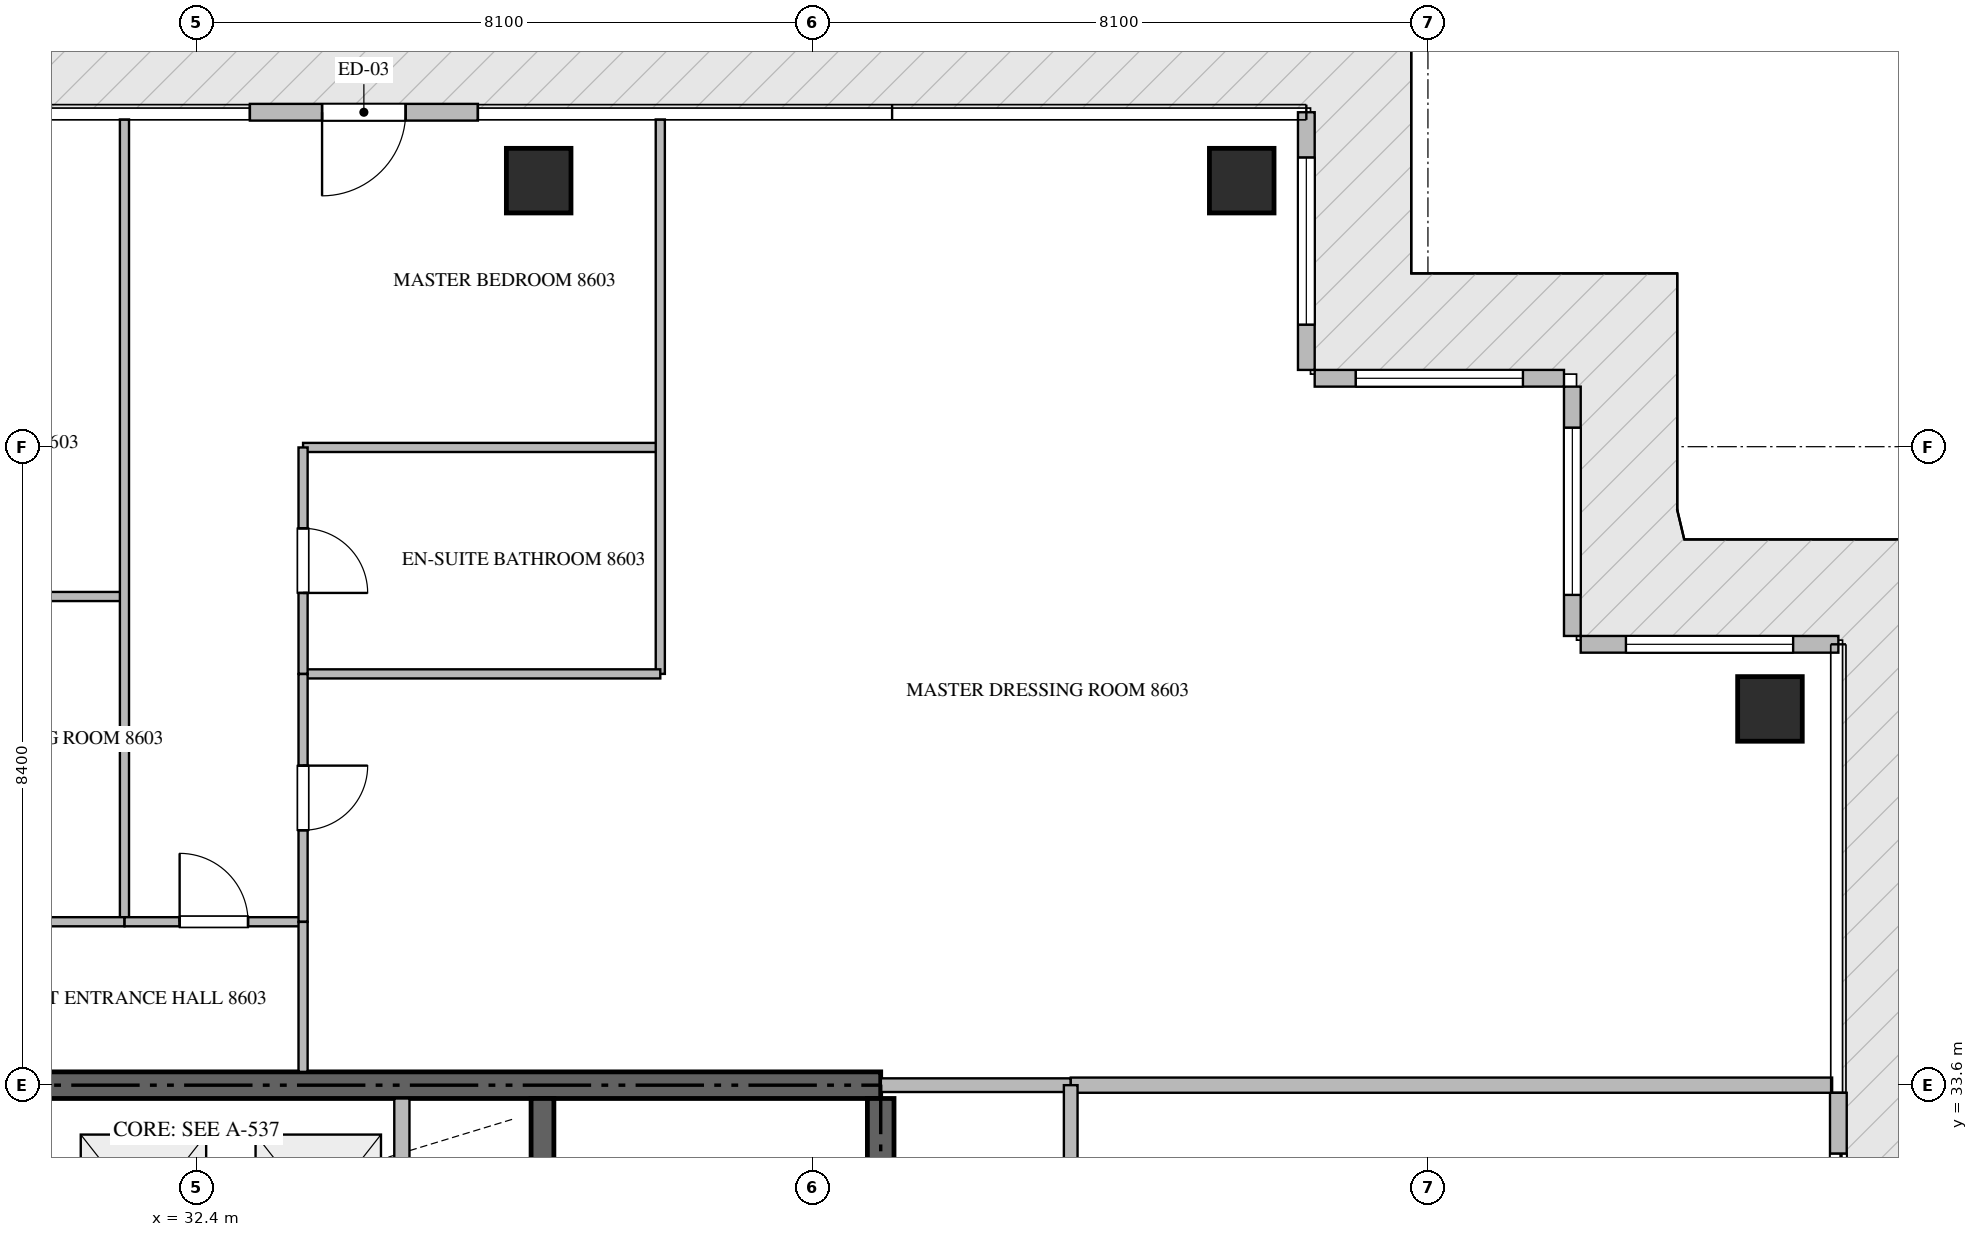
"""IFC4 building model, lengths in metres.
Left out: names, types, materials, properties, quantities, classifications, styles, units other than length and angle.
Written with IfcOpenShell. Run it as: python <this file> out.ifc"""

import sys

from ifc_helpers import new_model, si_unit, direction, frame, frame_2d, origin, origin_2d, place, context, subcontext, project, spatial, rectangle, extrude, source, transform, mapped, element, fill, save


model = new_model("IFC4")
c1 = context("Model", 3, precision=1e-05, world=origin(), true_north=direction((0.0, 1.0)))
c2 = subcontext(c1, "Body", "Model", "MODEL_VIEW")
j1 = project(units=[si_unit("LENGTHUNIT", "METRE"), si_unit("PLANEANGLEUNIT", "RADIAN")], contexts=[c1])
p1 = place(None, origin())
s1 = spatial("IfcSite", under=j1, at=p1, CompositionType="ELEMENT")
p2 = place(p1, origin())
s2 = spatial("IfcBuilding", under=s1, at=p2, CompositionType="ELEMENT")
p3 = place(p2, frame((0.0, 0.0, 347.95)))
s3 = spatial("IfcBuildingStorey", under=s2, at=p3, CompositionType="ELEMENT", Elevation=347.95)
p4 = place(p3, frame((41.4, 33.6, -0.26), z_axis=(0.0, 0.0, 1.0), x_axis=(-1.0, 0.0, 0.0)))
e1 = element("IfcWall", 1, at=p4, inside=s3, PredefinedType="SHEAR", context=c2, shape_type="SweptSolid", body=[
    extrude(rectangle(XDim=18.0, YDim=0.35, at=frame_2d((9.0, 0.0))), origin(), (0.0, 0.0, 1.0), 5.898),
])
p5 = place(p3, frame((41.4, 27.75, -0.26), z_axis=(0.0, 0.0, 1.0), x_axis=(0.0, 1.0, 0.0)))
e2 = element("IfcWall", 2, at=p5, inside=s3, PredefinedType="SHEAR", context=c2, shape_type="SweptSolid", body=[
    extrude(rectangle(XDim=5.675, YDim=0.35, at=frame_2d((2.837, 0.0))), origin(), (0.0, 0.0, 1.0), 5.898),
])
p6 = place(p3, frame((36.95, 27.05, -0.26), z_axis=(0.0, 0.0, 1.0), x_axis=(0.0, 1.0, 0.0)))
e3 = element("IfcWall", 3, at=p6, inside=s3, PredefinedType="SHEAR", context=c2, shape_type="SweptSolid", body=[
    extrude(rectangle(XDim=6.375, YDim=0.3, at=frame_2d((3.188, 0.0))), origin(), (0.0, 0.0, 1.0), 5.898),
])
m1 = source(origin(), c2, "Body", "SweptSolid", [
    extrude(rectangle(XDim=0.85, YDim=0.85, at=origin_2d()), origin(), (0.0, 0.0, 1.0), 5.9),
])
for number, where, z_axis, x_axis in (
    (4, (36.9, 45.5, -0.26), (0.0, 0.0, 1.0), (1.0, 0.0, 0.0)),
    (5, (46.15, 45.5, -0.26), (0.0, 0.0, 1.0), (1.0, 0.0, 0.0)),
    (6, (53.1, 38.55, -0.26), (0.0, 0.0, 1.0), (1.0, 0.0, 0.0)),
):
    element("IfcColumn", number, at=place(p3, frame(where, z_axis=z_axis, x_axis=x_axis)), inside=s3, PredefinedType="COLUMN", context=c2, shape_type="MappedRepresentation", body=[
        mapped(m1, transform((0.0, 0.0, 0.0), scale=1.0)),
    ])
p7 = place(p3, frame((54.0, 30.5, 0.0), z_axis=(0.0, 0.0, 1.0), x_axis=(0.0, 1.0, 0.0)))
e7 = element("IfcWall", 7, at=p7, inside=s3, PredefinedType="ELEMENTEDWALL", context=c2, shape_type="SweptSolid", body=[
    extrude(rectangle(XDim=3.0, YDim=0.22, at=frame_2d((1.5, 0.0))), origin(), (0.0, 0.0, 1.0), 5.625),
])
p8 = place(p7, frame((0.8, 0.0, 0.0)))
e8 = element("IfcOpeningElement", 8, at=p8, cuts=e7, PredefinedType="OPENING", context=c2, shape_type="SweptSolid", body=[
    extrude(rectangle(XDim=1.4, YDim=2.25, at=frame_2d((0.7, 1.125))), frame((0.0, 0.12, 0.0), z_axis=(0.0, -1.0, 0.0), x_axis=(1.0, 0.0, 0.0)), (0.0, 0.0, 1.0), 0.24),
])
p9 = place(p3, frame((54.0, 39.4, 0.0), z_axis=(0.0, 0.0, 1.0), x_axis=(-1.0, 0.0, 0.0)))
e9 = element("IfcWall", 9, at=p9, inside=s3, PredefinedType="ELEMENTEDWALL", context=c2, shape_type="SweptSolid", body=[
    extrude(rectangle(XDim=3.39, YDim=0.22, at=frame_2d((1.695, 0.0))), origin(), (0.0, 0.0, 1.0), 5.625),
])
p10 = place(p9, frame((0.595, 0.0, 0.65)))
e10 = element("IfcOpeningElement", 10, at=p10, cuts=e9, PredefinedType="OPENING", context=c2, shape_type="SweptSolid", body=[
    extrude(rectangle(XDim=2.2, YDim=2.4, at=frame_2d((1.1, 1.2))), frame((0.0, 0.12, 0.0), z_axis=(0.0, -1.0, 0.0), x_axis=(1.0, 0.0, 0.0)), (0.0, 0.0, 1.0), 0.24),
])
p11 = place(p3, frame((50.5, 39.51, 0.0), z_axis=(0.0, 0.0, 1.0), x_axis=(0.0, 1.0, 0.0)))
e11 = element("IfcWall", 11, at=p11, inside=s3, PredefinedType="ELEMENTEDWALL", context=c2, shape_type="SweptSolid", body=[
    extrude(rectangle(XDim=3.28, YDim=0.22, at=frame_2d((1.64, 0.0))), origin(), (0.0, 0.0, 1.0), 5.625),
])
p12 = place(p11, frame((0.54, 0.0, 0.65)))
e12 = element("IfcOpeningElement", 12, at=p12, cuts=e11, PredefinedType="OPENING", context=c2, shape_type="SweptSolid", body=[
    extrude(rectangle(XDim=2.2, YDim=2.4, at=frame_2d((1.1, 1.2))), frame((0.0, 0.12, 0.0), z_axis=(0.0, -1.0, 0.0), x_axis=(1.0, 0.0, 0.0)), (0.0, 0.0, 1.0), 0.24),
])
p13 = place(p3, frame((50.39, 42.9, 0.0), z_axis=(0.0, 0.0, 1.0), x_axis=(-1.0, 0.0, 0.0)))
e13 = element("IfcWall", 13, at=p13, inside=s3, PredefinedType="ELEMENTEDWALL", context=c2, shape_type="SweptSolid", body=[
    extrude(rectangle(XDim=3.28, YDim=0.22, at=frame_2d((1.64, 0.0))), origin(), (0.0, 0.0, 1.0), 5.625),
])
p14 = place(p13, frame((0.54, 0.0, 0.65)))
e14 = element("IfcOpeningElement", 14, at=p14, cuts=e13, PredefinedType="OPENING", context=c2, shape_type="SweptSolid", body=[
    extrude(rectangle(XDim=2.2, YDim=2.4, at=frame_2d((1.1, 1.2))), frame((0.0, 0.12, 0.0), z_axis=(0.0, -1.0, 0.0), x_axis=(1.0, 0.0, 0.0)), (0.0, 0.0, 1.0), 0.24),
])
p15 = place(p3, frame((47.0, 43.01, 0.0), z_axis=(0.0, 0.0, 1.0), x_axis=(0.0, 1.0, 0.0)))
e15 = element("IfcWall", 15, at=p15, inside=s3, PredefinedType="ELEMENTEDWALL", context=c2, shape_type="SweptSolid", body=[
    extrude(rectangle(XDim=3.39, YDim=0.22, at=frame_2d((1.695, 0.0))), origin(), (0.0, 0.0, 1.0), 5.625),
])
p16 = place(p15, frame((0.595, 0.0, 0.65)))
e16 = element("IfcOpeningElement", 16, at=p16, cuts=e15, PredefinedType="OPENING", context=c2, shape_type="SweptSolid", body=[
    extrude(rectangle(XDim=2.2, YDim=2.4, at=frame_2d((1.1, 1.2))), frame((0.0, 0.12, 0.0), z_axis=(0.0, -1.0, 0.0), x_axis=(1.0, 0.0, 0.0)), (0.0, 0.0, 1.0), 0.24),
])
p17 = place(p3, frame((36.1, 46.4, 0.0), z_axis=(0.0, 0.0, 1.0), x_axis=(-1.0, 0.0, 0.0)))
e17 = element("IfcWall", 17, at=p17, inside=s3, PredefinedType="ELEMENTEDWALL", context=c2, shape_type="SweptSolid", body=[
    extrude(rectangle(XDim=3.0, YDim=0.22, at=frame_2d((1.5, 0.0))), origin(), (0.0, 0.0, 1.0), 5.625),
])
p18 = place(p17, frame((0.95, 0.0, 0.0)))
e18 = element("IfcOpeningElement", 18, at=p18, cuts=e17, PredefinedType="OPENING", context=c2, shape_type="SweptSolid", body=[
    extrude(rectangle(XDim=1.1, YDim=2.2, at=frame_2d((0.55, 1.1))), frame((0.0, 0.12, 0.0), z_axis=(0.0, -1.0, 0.0), x_axis=(1.0, 0.0, 0.0)), (0.0, 0.0, 1.0), 0.24),
])
p19 = place(p3, frame((35.1, 30.75, 0.0), z_axis=(0.0, 0.0, 1.0), x_axis=(0.0, 1.0, 0.0)))
e19 = element("IfcWall", 19, at=p19, inside=s3, PredefinedType="STANDARD", context=c2, shape_type="SweptSolid", body=[
    extrude(rectangle(XDim=2.675, YDim=0.2, at=frame_2d((1.337, 0.0))), origin(), (0.0, 0.0, 1.0), 5.64),
])
p20 = place(p3, frame((43.9, 33.6, 0.0), z_axis=(0.0, 0.0, 1.0), x_axis=(1.0, 0.0, 0.0)))
e20 = element("IfcWall", 20, at=p20, inside=s3, PredefinedType="PARTITIONING", context=c2, shape_type="SweptSolid", body=[
    extrude(rectangle(XDim=10.018, YDim=0.2, at=frame_2d((5.009, 0.0))), origin(), (0.0, 0.0, 1.0), 5.64),
])
p21 = place(p3, frame((41.402, 33.6, 0.0), z_axis=(0.0, 0.0, 1.0), x_axis=(1.0, 0.0, 0.0)))
e21 = element("IfcWall", 21, at=p21, inside=s3, PredefinedType="PARTITIONING", context=c2, shape_type="SweptSolid", body=[
    extrude(rectangle(XDim=2.496, YDim=0.18, at=frame_2d((1.248, 0.0))), origin(), (0.0, 0.0, 1.0), 5.64),
])
p22 = place(p3, frame((43.9, 16.8, 0.0), z_axis=(0.0, 0.0, 1.0), x_axis=(0.0, 1.0, 0.0)))
e22 = element("IfcWall", 22, at=p22, inside=s3, PredefinedType="PARTITIONING", context=c2, shape_type="SweptSolid", body=[
    extrude(rectangle(XDim=16.8, YDim=0.18, at=frame_2d((8.4, 0.0))), origin(), (0.0, 0.0, 1.0), 5.64),
])
p23 = place(p22, frame((4.993, 0.0, 0.0)))
e23 = element("IfcOpeningElement", 23, at=p23, cuts=e22, PredefinedType="OPENING", context=c2, shape_type="SweptSolid", body=[
    extrude(rectangle(XDim=1.0, YDim=2.15, at=frame_2d((0.5, 1.075))), frame((0.0, 0.1, 0.0), z_axis=(0.0, -1.0, 0.0), x_axis=(1.0, 0.0, 0.0)), (0.0, 0.0, 1.0), 0.2),
])
p24 = place(p22, frame((13.351, 0.0, 0.0)))
e24 = element("IfcOpeningElement", 24, at=p24, cuts=e22, PredefinedType="OPENING", context=c2, shape_type="SweptSolid", body=[
    extrude(rectangle(XDim=1.0, YDim=2.15, at=frame_2d((0.5, 1.075))), frame((0.0, 0.1, 0.0), z_axis=(0.0, -1.0, 0.0), x_axis=(1.0, 0.0, 0.0)), (0.0, 0.0, 1.0), 0.2),
])
p25 = place(p3, frame((26.3, 40.029, 0.0), z_axis=(0.0, 0.0, 1.0), x_axis=(1.0, 0.0, 0.0)))
e25 = element("IfcWall", 25, at=p25, inside=s3, PredefinedType="PARTITIONING", context=c2, shape_type="SweptSolid", body=[
    extrude(rectangle(XDim=5.15, YDim=0.12, at=frame_2d((2.575, 0.0))), origin(), (0.0, 0.0, 1.0), 5.64),
])
p26 = place(p3, frame((31.45, 46.305, 0.0), z_axis=(0.0, 0.0, 1.0), x_axis=(0.0, -1.0, 0.0)))
e26 = element("IfcWall", 26, at=p26, inside=s3, PredefinedType="PARTITIONING", context=c2, shape_type="SweptSolid", body=[
    extrude(rectangle(XDim=10.555, YDim=0.12, at=frame_2d((5.277, 0.0))), origin(), (0.0, 0.0, 1.0), 5.64),
])
p27 = place(p3, frame((28.465, 35.75, 0.0), z_axis=(0.0, 0.0, 1.0), x_axis=(1.0, 0.0, 0.0)))
e27 = element("IfcWall", 27, at=p27, inside=s3, PredefinedType="PARTITIONING", context=c2, shape_type="SweptSolid", body=[
    extrude(rectangle(XDim=2.985, YDim=0.12, at=frame_2d((1.492, 0.0))), origin(), (0.0, 0.0, 1.0), 5.64),
])
p28 = place(p27, frame((1.067, 0.0, 0.0)))
e28 = element("IfcOpeningElement", 28, at=p28, cuts=e27, PredefinedType="OPENING", context=c2, shape_type="SweptSolid", body=[
    extrude(rectangle(XDim=0.85, YDim=2.1, at=frame_2d((0.425, 1.05))), frame((0.0, 0.07, 0.0), z_axis=(0.0, -1.0, 0.0), x_axis=(1.0, 0.0, 0.0)), (0.0, 0.0, 1.0), 0.14),
])
p29 = place(p3, frame((31.452, 35.75, 0.0), z_axis=(0.0, 0.0, 1.0), x_axis=(1.0, 0.0, 0.0)))
e29 = element("IfcWall", 29, at=p29, inside=s3, PredefinedType="PARTITIONING", context=c2, shape_type="SweptSolid", body=[
    extrude(rectangle(XDim=2.348, YDim=0.12, at=frame_2d((1.174, 0.0))), origin(), (0.0, 0.0, 1.0), 5.64),
])
p30 = place(p29, frame((0.724, 0.0, 0.0)))
e30 = element("IfcOpeningElement", 30, at=p30, cuts=e29, PredefinedType="OPENING", context=c2, shape_type="SweptSolid", body=[
    extrude(rectangle(XDim=0.9, YDim=2.1, at=frame_2d((0.45, 1.05))), frame((0.0, 0.07, 0.0), z_axis=(0.0, -1.0, 0.0), x_axis=(1.0, 0.0, 0.0)), (0.0, 0.0, 1.0), 0.14),
])
p31 = place(p3, frame((33.8, 41.99, 0.0), z_axis=(0.0, 0.0, 1.0), x_axis=(1.0, 0.0, 0.0)))
e31 = element("IfcWall", 31, at=p31, inside=s3, PredefinedType="PARTITIONING", context=c2, shape_type="SweptSolid", body=[
    extrude(rectangle(XDim=4.7, YDim=0.12, at=frame_2d((2.35, 0.0))), origin(), (0.0, 0.0, 1.0), 5.64),
])
p32 = place(p3, frame((38.5, 46.305, 0.0), z_axis=(0.0, 0.0, 1.0), x_axis=(0.0, -1.0, 0.0)))
e32 = element("IfcWall", 32, at=p32, inside=s3, PredefinedType="PARTITIONING", context=c2, shape_type="SweptSolid", body=[
    extrude(rectangle(XDim=7.294, YDim=0.12, at=frame_2d((3.647, 0.0))), origin(), (0.0, 0.0, 1.0), 5.64),
])
p33 = place(p3, frame((33.8, 39.011, 0.0), z_axis=(0.0, 0.0, 1.0), x_axis=(1.0, 0.0, 0.0)))
e33 = element("IfcWall", 33, at=p33, inside=s3, PredefinedType="PARTITIONING", context=c2, shape_type="SweptSolid", body=[
    extrude(rectangle(XDim=4.7, YDim=0.12, at=frame_2d((2.35, 0.0))), origin(), (0.0, 0.0, 1.0), 5.64),
])
p34 = place(p3, frame((33.8, 41.99, 0.0), z_axis=(0.0, 0.0, 1.0), x_axis=(0.0, -1.0, 0.0)))
e34 = element("IfcWall", 34, at=p34, inside=s3, PredefinedType="PARTITIONING", context=c2, shape_type="SweptSolid", body=[
    extrude(rectangle(XDim=2.979, YDim=0.12, at=frame_2d((1.49, 0.0))), origin(), (0.0, 0.0, 1.0), 5.64),
])
p35 = place(p34, frame((1.064, 0.0, 0.0)))
e35 = element("IfcOpeningElement", 35, at=p35, cuts=e34, PredefinedType="OPENING", context=c2, shape_type="SweptSolid", body=[
    extrude(rectangle(XDim=0.85, YDim=2.1, at=frame_2d((0.425, 1.05))), frame((0.0, 0.07, 0.0), z_axis=(0.0, -1.0, 0.0), x_axis=(1.0, 0.0, 0.0)), (0.0, 0.0, 1.0), 0.14),
])
p36 = place(p3, frame((33.8, 39.009, 0.0), z_axis=(0.0, 0.0, 1.0), x_axis=(0.0, -1.0, 0.0)))
e36 = element("IfcWall", 36, at=p36, inside=s3, PredefinedType="PARTITIONING", context=c2, shape_type="SweptSolid", body=[
    extrude(rectangle(XDim=3.259, YDim=0.12, at=frame_2d((1.629, 0.0))), origin(), (0.0, 0.0, 1.0), 5.64),
])
p37 = place(p36, frame((1.205, 0.0, 0.0)))
e37 = element("IfcOpeningElement", 37, at=p37, cuts=e36, PredefinedType="OPENING", context=c2, shape_type="SweptSolid", body=[
    extrude(rectangle(XDim=0.85, YDim=2.1, at=frame_2d((0.425, 1.05))), frame((0.0, 0.07, 0.0), z_axis=(0.0, -1.0, 0.0), x_axis=(1.0, 0.0, 0.0)), (0.0, 0.0, 1.0), 0.14),
])
p38 = place(p3, frame((33.8, 35.748, 0.0), z_axis=(0.0, 0.0, 1.0), x_axis=(0.0, -1.0, 0.0)))
e38 = element("IfcWall", 38, at=p38, inside=s3, PredefinedType="PARTITIONING", context=c2, shape_type="SweptSolid", body=[
    extrude(rectangle(XDim=1.973, YDim=0.12, at=frame_2d((0.987, 0.0))), origin(), (0.0, 0.0, 1.0), 5.64),
])
m2 = source(origin(), c2, "Body", "SweptSolid", [
    extrude(rectangle(XDim=1.4, YDim=2.25, at=frame_2d((0.7, 1.125))), frame((0.0, 0.025, 0.0), z_axis=(0.0, -1.0, 0.0), x_axis=(1.0, 0.0, 0.0)), (0.0, 0.0, 1.0), 0.05),
])
p39 = place(p8, origin())
e39 = element("IfcDoor", 39, at=p39, inside=s3, OperationType="SLIDING_TO_LEFT", PredefinedType="DOOR", context=c2, shape_type="MappedRepresentation", body=[
    mapped(m2, transform((0.0, 0.0, 0.0), scale=1.0)),
])
fill(e8, e39)
m3 = source(origin(), c2, "Body", "SweptSolid", [
    extrude(rectangle(XDim=2.2, YDim=2.4, at=frame_2d((1.1, 1.2))), frame((0.0, 0.03, 0.0), z_axis=(0.0, -1.0, 0.0), x_axis=(1.0, 0.0, 0.0)), (0.0, 0.0, 1.0), 0.06),
])
p40 = place(p10, origin())
e40 = element("IfcWindow", 40, at=p40, inside=s3, PartitioningType="SINGLE_PANEL", PredefinedType="WINDOW", context=c2, shape_type="MappedRepresentation", body=[
    mapped(m3, transform((0.0, 0.0, 0.0), scale=1.0)),
])
fill(e10, e40)
p41 = place(p12, origin())
e41 = element("IfcWindow", 41, at=p41, inside=s3, PartitioningType="SINGLE_PANEL", PredefinedType="WINDOW", context=c2, shape_type="MappedRepresentation", body=[
    mapped(m3, transform((0.0, 0.0, 0.0), scale=1.0)),
])
fill(e12, e41)
p42 = place(p14, origin())
e42 = element("IfcWindow", 42, at=p42, inside=s3, PartitioningType="SINGLE_PANEL", PredefinedType="WINDOW", context=c2, shape_type="MappedRepresentation", body=[
    mapped(m3, transform((0.0, 0.0, 0.0), scale=1.0)),
])
fill(e14, e42)
p43 = place(p16, origin())
e43 = element("IfcWindow", 43, at=p43, inside=s3, PartitioningType="SINGLE_PANEL", PredefinedType="WINDOW", context=c2, shape_type="MappedRepresentation", body=[
    mapped(m3, transform((0.0, 0.0, 0.0), scale=1.0)),
])
fill(e16, e43)
m4 = source(origin(), c2, "Body", "SweptSolid", [
    extrude(rectangle(XDim=1.1, YDim=2.2, at=frame_2d((0.55, 1.1))), frame((0.0, 0.025, 0.0), z_axis=(0.0, -1.0, 0.0), x_axis=(1.0, 0.0, 0.0)), (0.0, 0.0, 1.0), 0.05),
])
p44 = place(p18, origin())
e44 = element("IfcDoor", 44, at=p44, inside=s3, OperationType="SINGLE_SWING_RIGHT", PredefinedType="DOOR", context=c2, shape_type="MappedRepresentation", body=[
    mapped(m4, transform((0.0, 0.0, 0.0), scale=1.0)),
])
fill(e18, e44)
m5 = source(origin(), c2, "Body", "SweptSolid", [
    extrude(rectangle(XDim=0.9, YDim=2.1, at=frame_2d((0.45, 1.05))), frame((0.0, 0.025, 0.0), z_axis=(0.0, -1.0, 0.0), x_axis=(1.0, 0.0, 0.0)), (0.0, 0.0, 1.0), 0.05),
])
p45 = place(p30, origin())
e45 = element("IfcDoor", 45, at=p45, inside=s3, OperationType="SINGLE_SWING_LEFT", PredefinedType="DOOR", context=c2, shape_type="MappedRepresentation", body=[
    mapped(m5, transform((0.0, 0.0, 0.0), scale=1.0)),
])
fill(e30, e45)
m6 = source(origin(), c2, "Body", "SweptSolid", [
    extrude(rectangle(XDim=0.85, YDim=2.1, at=frame_2d((0.425, 1.05))), frame((0.0, 0.025, 0.0), z_axis=(0.0, -1.0, 0.0), x_axis=(1.0, 0.0, 0.0)), (0.0, 0.0, 1.0), 0.05),
])
p46 = place(p35, origin())
e46 = element("IfcDoor", 46, at=p46, inside=s3, OperationType="SINGLE_SWING_RIGHT", PredefinedType="DOOR", context=c2, shape_type="MappedRepresentation", body=[
    mapped(m6, transform((0.0, 0.0, 0.0), scale=1.0)),
])
fill(e35, e46)
p47 = place(p37, origin())
e47 = element("IfcDoor", 47, at=p47, inside=s3, OperationType="SINGLE_SWING_LEFT", PredefinedType="DOOR", context=c2, shape_type="MappedRepresentation", body=[
    mapped(m6, transform((0.0, 0.0, 0.0), scale=1.0)),
])
fill(e37, e47)
save(model, sys.argv[1])
